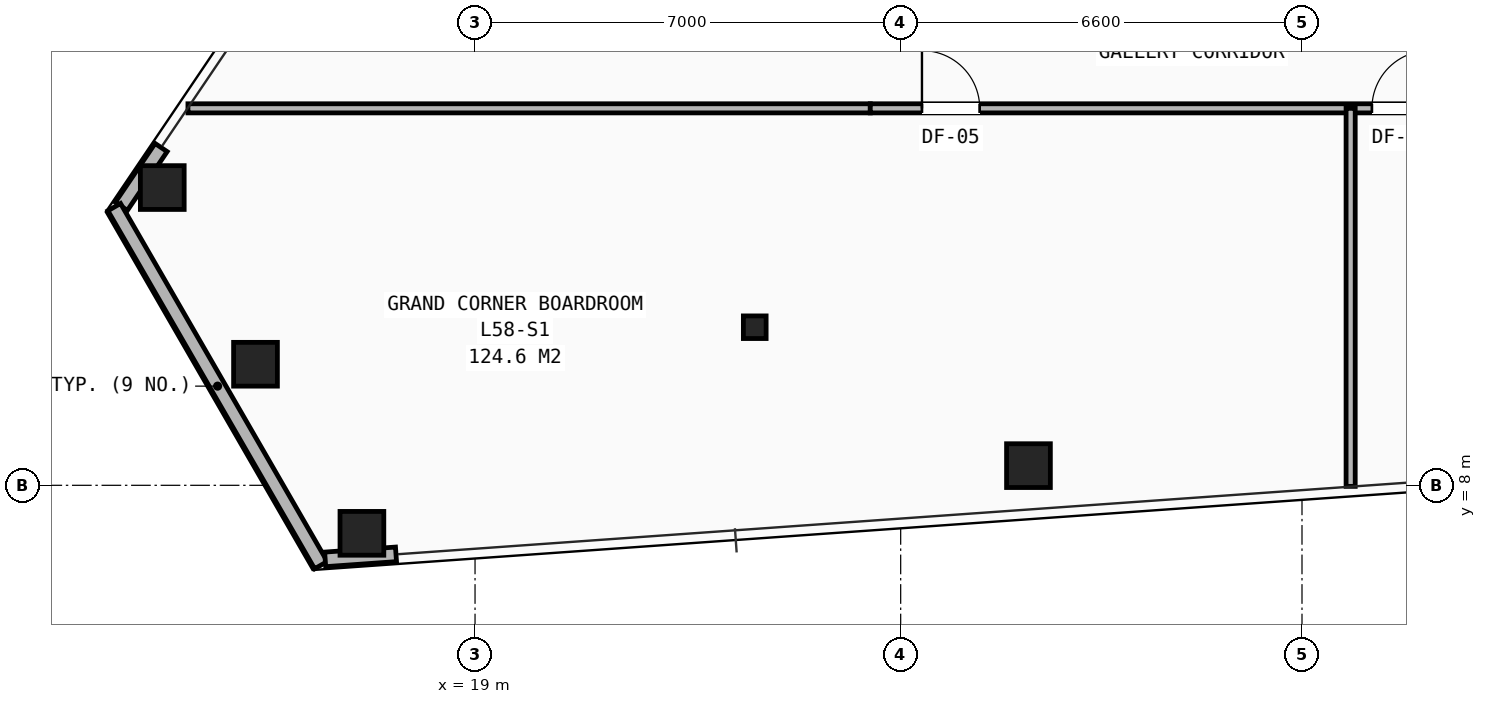
"""IFC4 building model, lengths in metres.
Left out: names, types, materials, properties, quantities, classifications, styles, units other than length and angle.
Written with IfcOpenShell. Run it as: python <this file> out.ifc"""

import sys

from ifc_helpers import new_model, si_unit, direction, frame, frame_2d, origin, origin_2d, place, context, subcontext, project, spatial, rectangle, hollow_rectangle, i_section, extrude, element, fill, save


model = new_model("IFC4")
c1 = context("Model", 3, precision=1e-05, world=origin(), true_north=direction((0.0, 1.0)))
c2 = subcontext(c1, "Body", "Model", "MODEL_VIEW")
j1 = project(units=[si_unit("LENGTHUNIT", "METRE"), si_unit("PLANEANGLEUNIT", "RADIAN")], contexts=[c1])
p1 = place(None, origin())
s1 = spatial("IfcSite", under=j1, at=p1, CompositionType="ELEMENT")
p2 = place(p1, origin())
s2 = spatial("IfcBuilding", under=s1, at=p2, CompositionType="ELEMENT")
p3 = place(p2, frame((0.0, 0.0, 204.9)))
s3 = spatial("IfcBuildingStorey", under=s2, at=p3, CompositionType="ELEMENT", Elevation=204.9)
p4 = place(p3, frame((23.6, 10.6, 0.0), z_axis=(0.0, 0.0, 1.0), x_axis=(1.0, 0.0, 0.0)))
e1 = element("IfcColumn", 1, at=p4, inside=s3, PredefinedType="COLUMN", context=c2, shape_type="SweptSolid", body=[
    extrude(i_section(OverallWidth=0.374, OverallDepth=0.372, WebThickness=0.016, FlangeThickness=0.026, at=origin_2d()), origin(), (0.0, 0.0, 1.0), 3.5),
])
for number, where, z_axis, x_axis in (
    (2, (13.856, 12.897, 0.0), (0.0, 0.0, 1.0), (1.0, 0.0, 0.0)),
    (3, (15.389, 9.991, 0.0), (0.0, 0.0, 1.0), (1.0, 0.0, 0.0)),
    (4, (17.14, 7.21, 0.0), (0.0, 0.0, 1.0), (1.0, 0.0, 0.0)),
    (5, (28.102, 8.323, 0.0), (0.0, 0.0, 1.0), (1.0, 0.0, 0.0)),
):
    element("IfcColumn", number, at=place(p3, frame(where, z_axis=z_axis, x_axis=x_axis)), inside=s3, PredefinedType="COLUMN", context=c2, shape_type="SweptSolid", body=[
        extrude(hollow_rectangle(XDim=0.72, YDim=0.72, WallThickness=0.05, at=origin_2d()), origin(), (0.0, 0.0, 1.0), 3.5),
    ])
p5 = place(p3, frame((13.837, 13.556, 0.0), z_axis=(0.0, 0.0, 1.0), x_axis=(-0.559997089768, -0.828494574183, 0.0)))
e6 = element("IfcWall", 6, at=p5, inside=s3, PredefinedType="SHEAR", context=c2, shape_type="SweptSolid", body=[
    extrude(rectangle(XDim=1.167, YDim=0.24, at=frame_2d((0.584, 0.0))), origin(), (0.0, 0.0, 1.0), 2.623),
])
p6 = place(p3, frame((16.466, 6.687, 0.0), z_axis=(0.0, 0.0, 1.0), x_axis=(-0.500004222222, 0.866022966069, 0.0)))
e7 = element("IfcWall", 7, at=p6, inside=s3, PredefinedType="SHEAR", context=c2, shape_type="SweptSolid", body=[
    extrude(rectangle(XDim=6.8, YDim=0.24, at=frame_2d((3.4, 0.0))), origin(), (0.0, 0.0, 1.0), 2.623),
])
p7 = place(p3, frame((16.535, 6.782, 0.0), z_axis=(0.0, 0.0, 1.0), x_axis=(0.997485162718, 0.070875596345, 0.0)))
e8 = element("IfcWall", 8, at=p7, inside=s3, PredefinedType="SHEAR", context=c2, shape_type="SweptSolid", body=[
    extrude(rectangle(XDim=1.168, YDim=0.24, at=frame_2d((0.584, 0.0))), origin(), (0.0, 0.0, 1.0), 2.623),
])
p8 = place(p3, frame((14.279, 14.2, 0.0), z_axis=(0.0, 0.0, 1.0), x_axis=(1.0, 0.0, 0.0)))
e9 = element("IfcWall", 9, at=p8, inside=s3, PredefinedType="PARTITIONING", context=c2, shape_type="SweptSolid", body=[
    extrude(rectangle(XDim=11.221, YDim=0.15, at=frame_2d((5.611, 0.0))), origin(), (0.0, 0.0, 1.0), 2.292),
])
p9 = place(p3, frame((25.5, 14.2, 0.0), z_axis=(0.0, 0.0, 1.0), x_axis=(1.0, 0.0, 0.0)))
e10 = element("IfcWall", 10, at=p9, inside=s3, PredefinedType="PARTITIONING", context=c2, shape_type="SweptSolid", body=[
    extrude(rectangle(XDim=29.0, YDim=0.15, at=frame_2d((14.5, 0.0))), origin(), (0.0, 0.0, 1.0), 2.292),
])
p10 = place(p9, frame((0.85, 0.0, 0.0)))
e11 = element("IfcOpeningElement", 11, at=p10, cuts=e10, PredefinedType="OPENING", context=c2, shape_type="SweptSolid", body=[
    extrude(rectangle(XDim=0.95, YDim=2.1, at=frame_2d((0.475, 1.05))), frame((0.0, 0.085, 0.0), z_axis=(0.0, -1.0, 0.0), x_axis=(1.0, 0.0, 0.0)), (0.0, 0.0, 1.0), 0.17),
])
p11 = place(p9, frame((8.25, 0.0, 0.0)))
e12 = element("IfcOpeningElement", 12, at=p11, cuts=e10, PredefinedType="OPENING", context=c2, shape_type="SweptSolid", body=[
    extrude(rectangle(XDim=0.95, YDim=2.1, at=frame_2d((0.475, 1.05))), frame((0.0, 0.085, 0.0), z_axis=(0.0, -1.0, 0.0), x_axis=(1.0, 0.0, 0.0)), (0.0, 0.0, 1.0), 0.17),
])
p12 = place(p9, frame((13.05, 0.0, 0.0)))
e13 = element("IfcOpeningElement", 13, at=p12, cuts=e10, PredefinedType="OPENING", context=c2, shape_type="SweptSolid", body=[
    extrude(rectangle(XDim=0.95, YDim=2.1, at=frame_2d((0.475, 1.05))), frame((0.0, 0.085, 0.0), z_axis=(0.0, -1.0, 0.0), x_axis=(1.0, 0.0, 0.0)), (0.0, 0.0, 1.0), 0.17),
])
p13 = place(p9, frame((18.05, 0.0, 0.0)))
e14 = element("IfcOpeningElement", 14, at=p13, cuts=e10, PredefinedType="OPENING", context=c2, shape_type="SweptSolid", body=[
    extrude(rectangle(XDim=0.95, YDim=2.1, at=frame_2d((0.475, 1.05))), frame((0.0, 0.085, 0.0), z_axis=(0.0, -1.0, 0.0), x_axis=(1.0, 0.0, 0.0)), (0.0, 0.0, 1.0), 0.17),
])
p14 = place(p3, frame((33.4, 7.982, 0.0), z_axis=(0.0, 0.0, 1.0), x_axis=(0.0, 1.0, 0.0)))
e15 = element("IfcWall", 15, at=p14, inside=s3, PredefinedType="PARTITIONING", context=c2, shape_type="SweptSolid", body=[
    extrude(rectangle(XDim=6.218, YDim=0.15, at=frame_2d((3.109, 0.0))), origin(), (0.0, 0.0, 1.0), 2.628),
])
p15 = place(p10, origin())
e16 = element("IfcDoor", 16, at=p15, inside=s3, OperationType="SINGLE_SWING_LEFT", PredefinedType="DOOR", context=c2, shape_type="SweptSolid", body=[
    extrude(rectangle(XDim=0.95, YDim=2.1, at=frame_2d((0.475, 1.05))), frame((0.0, 0.025, 0.0), z_axis=(0.0, -1.0, 0.0), x_axis=(1.0, 0.0, 0.0)), (0.0, 0.0, 1.0), 0.05),
])
fill(e11, e16)
p16 = place(p11, origin())
e17 = element("IfcDoor", 17, at=p16, inside=s3, OperationType="SINGLE_SWING_RIGHT", PredefinedType="DOOR", context=c2, shape_type="SweptSolid", body=[
    extrude(rectangle(XDim=0.95, YDim=2.1, at=frame_2d((0.475, 1.05))), frame((0.0, 0.025, 0.0), z_axis=(0.0, -1.0, 0.0), x_axis=(1.0, 0.0, 0.0)), (0.0, 0.0, 1.0), 0.05),
])
fill(e12, e17)
save(model, sys.argv[1])
